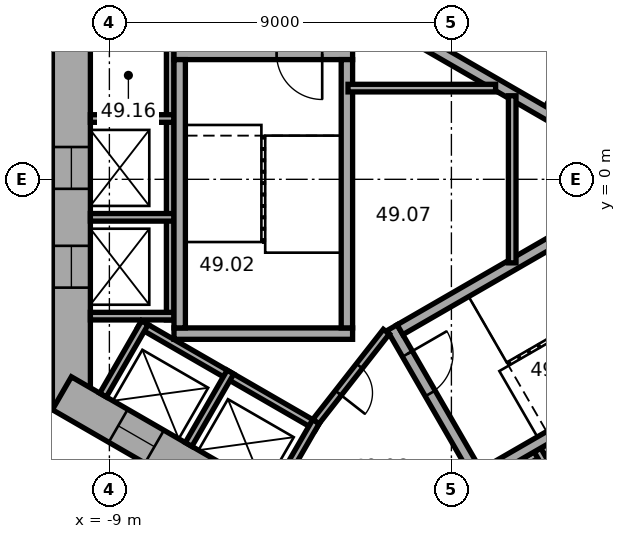
"""IFC4 building model, lengths in metres.
Left out: names, types, materials, properties, quantities, classifications, styles, units other than length and angle.
Written with IfcOpenShell. Run it as: python <this file> out.ifc"""

import sys

from ifc_helpers import new_model, si_unit, direction, frame, frame_2d, origin, place, context, subcontext, project, spatial, rectangle, extrude, element, fill, save


model = new_model("IFC4")
c1 = context("Model", 3, precision=1e-05, world=origin(), true_north=direction((0.0, 1.0)))
c2 = subcontext(c1, "Body", "Model", "MODEL_VIEW")
j1 = project(units=[si_unit("LENGTHUNIT", "METRE"), si_unit("PLANEANGLEUNIT", "RADIAN")], contexts=[c1])
p1 = place(None, origin())
s1 = spatial("IfcSite", under=j1, at=p1, CompositionType="ELEMENT")
p2 = place(p1, origin())
s2 = spatial("IfcBuilding", under=s1, at=p2, CompositionType="ELEMENT")
p3 = place(p2, frame((0.0, 0.0, 198.4)))
s3 = spatial("IfcBuildingStorey", under=s2, at=p3, CompositionType="ELEMENT", Elevation=198.4)
p4 = place(p3, frame((-10.0, 6.062, 0.0), z_axis=(0.0, 0.0, 1.0), x_axis=(0.0, -1.0, 0.0)))
e1 = element("IfcWall", 1, at=p4, inside=s3, PredefinedType="SHEAR", context=c2, shape_type="SweptSolid", body=[
    extrude(rectangle(XDim=12.125, YDim=1.0, at=frame_2d((6.062, 0.0))), origin(), (0.0, 0.0, 1.0), 3.7),
])
p5 = place(p4, frame((5.212, 0.0, 0.0)))
e2 = element("IfcOpeningElement", 2, at=p5, cuts=e1, PredefinedType="OPENING", context=c2, shape_type="SweptSolid", body=[
    extrude(rectangle(XDim=1.1, YDim=2.1, at=frame_2d((0.55, 1.05))), frame((0.0, 0.51, 0.0), z_axis=(0.0, -1.0, 0.0), x_axis=(1.0, 0.0, 0.0)), (0.0, 0.0, 1.0), 1.02),
])
p6 = place(p4, frame((7.812, 0.0, 0.0)))
e3 = element("IfcOpeningElement", 3, at=p6, cuts=e1, PredefinedType="OPENING", context=c2, shape_type="SweptSolid", body=[
    extrude(rectangle(XDim=1.1, YDim=2.1, at=frame_2d((0.55, 1.05))), frame((0.0, 0.51, 0.0), z_axis=(0.0, -1.0, 0.0), x_axis=(1.0, 0.0, 0.0)), (0.0, 0.0, 1.0), 1.02),
])
p7 = place(p3, frame((-10.25, -5.629, 0.0), z_axis=(0.0, 0.0, 1.0), x_axis=(0.866022616891, -0.50000482701, 0.0)))
e4 = element("IfcWall", 4, at=p7, inside=s3, PredefinedType="SHEAR", context=c2, shape_type="SweptSolid", body=[
    extrude(rectangle(XDim=12.125, YDim=1.0, at=frame_2d((6.062, 0.0))), origin(), (0.0, 0.0, 1.0), 3.7),
])
p8 = place(p7, frame((6.262, 0.0, 0.0)))
e5 = element("IfcOpeningElement", 5, at=p8, cuts=e4, PredefinedType="OPENING", context=c2, shape_type="SweptSolid", body=[
    extrude(rectangle(XDim=1.5, YDim=2.1, at=frame_2d((0.75, 1.05))), frame((0.0, 0.51, 0.0), z_axis=(0.0, -1.0, 0.0), x_axis=(1.0, 0.0, 0.0)), (0.0, 0.0, 1.0), 1.02),
])
p9 = place(p7, frame((1.712, 0.0, 0.0)))
e6 = element("IfcOpeningElement", 6, at=p9, cuts=e4, PredefinedType="OPENING", context=c2, shape_type="SweptSolid", body=[
    extrude(rectangle(XDim=1.1, YDim=2.1, at=frame_2d((0.55, 1.05))), frame((0.0, 0.51, 0.0), z_axis=(0.0, -1.0, 0.0), x_axis=(1.0, 0.0, 0.0)), (0.0, 0.0, 1.0), 1.02),
])
p10 = place(p7, frame((4.312, 0.0, 0.0)))
e7 = element("IfcOpeningElement", 7, at=p10, cuts=e4, PredefinedType="OPENING", context=c2, shape_type="SweptSolid", body=[
    extrude(rectangle(XDim=1.1, YDim=2.1, at=frame_2d((0.55, 1.05))), frame((0.0, 0.51, 0.0), z_axis=(0.0, -1.0, 0.0), x_axis=(1.0, 0.0, 0.0)), (0.0, 0.0, 1.0), 1.02),
])
p11 = place(p3, frame((-0.25, -11.691, 0.0), z_axis=(0.0, 0.0, 1.0), x_axis=(0.866022616891, 0.50000482701, 0.0)))
e8 = element("IfcWall", 8, at=p11, inside=s3, PredefinedType="SHEAR", context=c2, shape_type="SweptSolid", body=[
    extrude(rectangle(XDim=12.125, YDim=1.0, at=frame_2d((6.062, 0.0))), origin(), (0.0, 0.0, 1.0), 3.7),
])
p12 = place(p11, frame((2.612, 0.0, 0.0)))
e9 = element("IfcOpeningElement", 9, at=p12, cuts=e8, PredefinedType="OPENING", context=c2, shape_type="SweptSolid", body=[
    extrude(rectangle(XDim=1.1, YDim=2.1, at=frame_2d((0.55, 1.05))), frame((0.0, 0.51, 0.0), z_axis=(0.0, -1.0, 0.0), x_axis=(1.0, 0.0, 0.0)), (0.0, 0.0, 1.0), 1.02),
])
p13 = place(p11, frame((5.212, 0.0, 0.0)))
e10 = element("IfcOpeningElement", 10, at=p13, cuts=e8, PredefinedType="OPENING", context=c2, shape_type="SweptSolid", body=[
    extrude(rectangle(XDim=1.1, YDim=2.1, at=frame_2d((0.55, 1.05))), frame((0.0, 0.51, 0.0), z_axis=(0.0, -1.0, 0.0), x_axis=(1.0, 0.0, 0.0)), (0.0, 0.0, 1.0), 1.02),
])
p14 = place(p11, frame((7.812, 0.0, 0.0)))
e11 = element("IfcOpeningElement", 11, at=p14, cuts=e8, PredefinedType="OPENING", context=c2, shape_type="SweptSolid", body=[
    extrude(rectangle(XDim=1.1, YDim=2.1, at=frame_2d((0.55, 1.05))), frame((0.0, 0.51, 0.0), z_axis=(0.0, -1.0, 0.0), x_axis=(1.0, 0.0, 0.0)), (0.0, 0.0, 1.0), 1.02),
])
p15 = place(p3, frame((-7.4, 4.3, 0.0), z_axis=(0.0, 0.0, 1.0), x_axis=(0.0, -1.0, 0.0)))
e12 = element("IfcWall", 12, at=p15, inside=s3, PredefinedType="PARTITIONING", context=c2, shape_type="SweptSolid", body=[
    extrude(rectangle(XDim=8.0, YDim=0.2, at=frame_2d((4.0, 0.0))), origin(), (0.0, 0.0, 1.0), 3.42),
])
for number, where, z_axis, x_axis in (
    (13, (-7.3, 1.6, 0.0), (0.0, 0.0, 1.0), (-1.0, 0.0, 0.0)),
    (14, (-7.3, -1.0, 0.0), (0.0, 0.0, 1.0), (-1.0, 0.0, 0.0)),
    (15, (-7.3, -3.6, 0.0), (0.0, 0.0, 1.0), (-1.0, 0.0, 0.0)),
):
    element("IfcWall", number, at=place(p3, frame(where, z_axis=z_axis, x_axis=x_axis)), inside=s3, PredefinedType="PARTITIONING", context=c2, shape_type="SweptSolid", body=[
        extrude(rectangle(XDim=2.2, YDim=0.2, at=frame_2d((1.1, 0.0))), origin(), (0.0, 0.0, 1.0), 3.42),
    ])
p16 = place(p3, frame((-8.203, -3.809, 0.0), z_axis=(0.0, 0.0, 1.0), x_axis=(0.866028230842, -0.499995103361, 0.0)))
e16 = element("IfcWall", 16, at=p16, inside=s3, PredefinedType="PARTITIONING", context=c2, shape_type="SweptSolid", body=[
    extrude(rectangle(XDim=5.4, YDim=0.2, at=frame_2d((2.7, 0.0))), origin(), (0.0, 0.0, 1.0), 3.42),
])
for number, where, z_axis, x_axis in (
    (17, (-8.067, -3.772, 0.0), (0.0, 0.0, 1.0), (-0.5, -0.866, 0.0)),
    (18, (-5.815, -5.072, 0.0), (0.0, 0.0, 1.0), (-0.5, -0.866, 0.0)),
):
    element("IfcWall", number, at=place(p3, frame(where, z_axis=z_axis, x_axis=x_axis)), inside=s3, PredefinedType="PARTITIONING", context=c2, shape_type="SweptSolid", body=[
        extrude(rectangle(XDim=2.2, YDim=0.2, at=frame_2d((1.1, 0.0))), origin(), (0.0, 0.0, 1.0), 3.42),
    ])
p17 = place(p3, frame((-3.563, -6.372, 0.0), z_axis=(0.0, 0.0, 1.0), x_axis=(-0.499994660107, -0.866028486751, 0.0)))
e19 = element("IfcWall", 19, at=p17, inside=s3, PredefinedType="PARTITIONING", context=c2, shape_type="SweptSolid", body=[
    extrude(rectangle(XDim=2.2, YDim=0.2, at=frame_2d((1.1, 0.0))), origin(), (0.0, 0.0, 1.0), 3.42),
])
p18 = place(p3, frame((-0.024, -8.559, 0.0), z_axis=(0.0, 0.0, 1.0), x_axis=(0.866026010844, 0.49999894854, 0.0)))
e20 = element("IfcWall", 20, at=p18, inside=s3, PredefinedType="PARTITIONING", context=c2, shape_type="SweptSolid", body=[
    extrude(rectangle(XDim=8.0, YDim=0.2, at=frame_2d((4.0, 0.0))), origin(), (0.0, 0.0, 1.0), 3.42),
])
p19 = place(p3, frame((2.264, -7.122, 0.0), z_axis=(0.0, 0.0, 1.0), x_axis=(0.500077893725, -0.86598042715, 0.0)))
e21 = element("IfcWall", 21, at=p19, inside=s3, PredefinedType="PARTITIONING", context=c2, shape_type="SweptSolid", body=[
    extrude(rectangle(XDim=2.2, YDim=0.2, at=frame_2d((1.1, 0.0))), origin(), (0.0, 0.0, 1.0), 3.42),
])
p20 = place(p3, frame((4.103, 0.807, 0.0), z_axis=(0.0, 0.0, 1.0), x_axis=(-0.866027801685, 0.499995846692, 0.0)))
e22 = element("IfcWall", 22, at=p20, inside=s3, PredefinedType="SHEAR", context=c2, shape_type="SweptSolid", body=[
    extrude(rectangle(XDim=7.06, YDim=0.3, at=frame_2d((3.53, 0.0))), origin(), (0.0, 0.0, 1.0), 3.42),
])
p21 = place(p3, frame((-2.6, 3.3, 0.0), z_axis=(0.0, 0.0, 1.0), x_axis=(-1.0, 0.0, 0.0)))
e23 = element("IfcWall", 23, at=p21, inside=s3, PredefinedType="SHEAR", context=c2, shape_type="SweptSolid", body=[
    extrude(rectangle(XDim=4.7, YDim=0.3, at=frame_2d((2.35, 0.0))), origin(), (0.0, 0.0, 1.0), 3.42),
])
p22 = place(p21, frame((0.8, 0.0, 0.0)))
e24 = element("IfcOpeningElement", 24, at=p22, cuts=e23, PredefinedType="OPENING", context=c2, shape_type="SweptSolid", body=[
    extrude(rectangle(XDim=1.2, YDim=2.1, at=frame_2d((0.6, 1.05))), frame((0.0, 0.16, 0.0), z_axis=(0.0, -1.0, 0.0), x_axis=(1.0, 0.0, 0.0)), (0.0, 0.0, 1.0), 0.32),
])
p23 = place(p3, frame((-2.6, -4.06, 0.0), z_axis=(0.0, 0.0, 1.0), x_axis=(-1.0, 0.0, 0.0)))
e25 = element("IfcWall", 25, at=p23, inside=s3, PredefinedType="SHEAR", context=c2, shape_type="SweptSolid", body=[
    extrude(rectangle(XDim=4.7, YDim=0.3, at=frame_2d((2.35, 0.0))), origin(), (0.0, 0.0, 1.0), 3.42),
])
for number, where, z_axis, x_axis in (
    (26, (-2.75, 3.15, 0.0), (0.0, 0.0, 1.0), (0.0, -1.0, 0.0)),
    (27, (-7.15, 3.15, 0.0), (0.0, 0.0, 1.0), (0.0, -1.0, 0.0)),
):
    element("IfcWall", number, at=place(p3, frame(where, z_axis=z_axis, x_axis=x_axis)), inside=s3, PredefinedType="SHEAR", context=c2, shape_type="SweptSolid", body=[
        extrude(rectangle(XDim=7.06, YDim=0.3, at=frame_2d((3.53, 0.0))), origin(), (0.0, 0.0, 1.0), 3.42),
    ])
p24 = place(p3, frame((-1.558, -3.902, 0.0), z_axis=(0.0, 0.0, 1.0), x_axis=(0.499977259774, -0.866038532462, 0.0)))
e28 = element("IfcWall", 28, at=p24, inside=s3, PredefinedType="SHEAR", context=c2, shape_type="SweptSolid", body=[
    extrude(rectangle(XDim=4.7, YDim=0.3, at=frame_2d((2.35, 0.0))), origin(), (0.0, 0.0, 1.0), 3.42),
])
p25 = place(p24, frame((0.8, 0.0, 0.0)))
e29 = element("IfcOpeningElement", 29, at=p25, cuts=e28, PredefinedType="OPENING", context=c2, shape_type="SweptSolid", body=[
    extrude(rectangle(XDim=1.2, YDim=2.1, at=frame_2d((0.6, 1.05))), frame((0.0, 0.16, 0.0), z_axis=(0.0, -1.0, 0.0), x_axis=(1.0, 0.0, 0.0)), (0.0, 0.0, 1.0), 0.32),
])
for number, where, z_axis, x_axis in (
    (30, (-1.353, -3.957, 0.0), (0.0, 0.0, 1.0), (0.866, 0.5, 0.0)),
    (31, (0.847, -7.767, 0.0), (0.0, 0.0, 1.0), (0.866, 0.5, 0.0)),
):
    element("IfcWall", number, at=place(p3, frame(where, z_axis=z_axis, x_axis=x_axis)), inside=s3, PredefinedType="SHEAR", context=c2, shape_type="SweptSolid", body=[
        extrude(rectangle(XDim=7.06, YDim=0.3, at=frame_2d((3.53, 0.0))), origin(), (0.0, 0.0, 1.0), 3.42),
    ])
p26 = place(p3, frame((-1.712, -4.008, 0.0), z_axis=(0.0, 0.0, 1.0), x_axis=(-0.616549420702, -0.787316208287, 0.0)))
e32 = element("IfcWall", 32, at=p26, inside=s3, PredefinedType="PARTITIONING", context=c2, shape_type="SweptSolid", body=[
    extrude(rectangle(XDim=3.002, YDim=0.2, at=frame_2d((1.501, 0.0))), origin(), (0.0, 0.0, 1.0), 3.42),
])
p27 = place(p26, frame((1.15, 0.0, 0.0)))
e33 = element("IfcOpeningElement", 33, at=p27, cuts=e32, PredefinedType="OPENING", context=c2, shape_type="SweptSolid", body=[
    extrude(rectangle(XDim=0.9, YDim=2.1, at=frame_2d((0.45, 1.05))), frame((0.0, 0.11, 0.0), z_axis=(0.0, -1.0, 0.0), x_axis=(1.0, 0.0, 0.0)), (0.0, 0.0, 1.0), 0.22),
])
p28 = place(p3, frame((-2.72, 2.4, 0.0), z_axis=(0.0, 0.0, 1.0), x_axis=(1.0, 0.0, 0.0)))
e34 = element("IfcWall", 34, at=p28, inside=s3, PredefinedType="PARTITIONING", context=c2, shape_type="SweptSolid", body=[
    extrude(rectangle(XDim=3.883, YDim=0.2, at=frame_2d((1.941, 0.0))), origin(), (0.0, 0.0, 1.0), 3.42),
])
p29 = place(p3, frame((1.6, -2.198, 0.0), z_axis=(0.0, 0.0, 1.0), x_axis=(0.0, 1.0, 0.0)))
e35 = element("IfcWall", 35, at=p29, inside=s3, PredefinedType="PARTITIONING", context=c2, shape_type="SweptSolid", body=[
    extrude(rectangle(XDim=4.397, YDim=0.2, at=frame_2d((2.198, 0.0))), origin(), (0.0, 0.0, 1.0), 3.42),
])
p30 = place(p22, origin())
e36 = element("IfcDoor", 36, at=p30, inside=s3, OperationType="SINGLE_SWING_RIGHT", PredefinedType="DOOR", context=c2, shape_type="SweptSolid", body=[
    extrude(rectangle(XDim=1.2, YDim=2.1, at=frame_2d((0.6, 1.05))), frame((0.0, 0.025, 0.0), z_axis=(0.0, -1.0, 0.0), x_axis=(1.0, 0.0, 0.0)), (0.0, 0.0, 1.0), 0.05),
])
fill(e24, e36)
p31 = place(p25, origin())
e37 = element("IfcDoor", 37, at=p31, inside=s3, OperationType="SINGLE_SWING_RIGHT", PredefinedType="DOOR", context=c2, shape_type="SweptSolid", body=[
    extrude(rectangle(XDim=1.2, YDim=2.1, at=frame_2d((0.6, 1.05))), frame((0.0, 0.025, 0.0), z_axis=(0.0, -1.0, 0.0), x_axis=(1.0, 0.0, 0.0)), (0.0, 0.0, 1.0), 0.05),
])
fill(e29, e37)
p32 = place(p27, origin())
e38 = element("IfcDoor", 38, at=p32, inside=s3, OperationType="SINGLE_SWING_LEFT", PredefinedType="DOOR", context=c2, shape_type="SweptSolid", body=[
    extrude(rectangle(XDim=0.9, YDim=2.1, at=frame_2d((0.45, 1.05))), frame((0.0, 0.025, 0.0), z_axis=(0.0, -1.0, 0.0), x_axis=(1.0, 0.0, 0.0)), (0.0, 0.0, 1.0), 0.05),
])
fill(e33, e38)
p33 = place(p5, origin())
e39 = element("IfcDoor", 39, at=p33, inside=s3, OperationType="DOUBLE_DOOR_SLIDING", PredefinedType="DOOR", context=c2, shape_type="SweptSolid", body=[
    extrude(rectangle(XDim=1.1, YDim=2.1, at=frame_2d((0.55, 1.05))), frame((0.0, 0.025, 0.0), z_axis=(0.0, -1.0, 0.0), x_axis=(1.0, 0.0, 0.0)), (0.0, 0.0, 1.0), 0.05),
])
fill(e2, e39)
p34 = place(p6, origin())
e40 = element("IfcDoor", 40, at=p34, inside=s3, OperationType="DOUBLE_DOOR_SLIDING", PredefinedType="DOOR", context=c2, shape_type="SweptSolid", body=[
    extrude(rectangle(XDim=1.1, YDim=2.1, at=frame_2d((0.55, 1.05))), frame((0.0, 0.025, 0.0), z_axis=(0.0, -1.0, 0.0), x_axis=(1.0, 0.0, 0.0)), (0.0, 0.0, 1.0), 0.05),
])
fill(e3, e40)
p35 = place(p9, origin())
e41 = element("IfcDoor", 41, at=p35, inside=s3, OperationType="DOUBLE_DOOR_SLIDING", PredefinedType="DOOR", context=c2, shape_type="SweptSolid", body=[
    extrude(rectangle(XDim=1.1, YDim=2.1, at=frame_2d((0.55, 1.05))), frame((0.0, 0.025, 0.0), z_axis=(0.0, -1.0, 0.0), x_axis=(1.0, 0.0, 0.0)), (0.0, 0.0, 1.0), 0.05),
])
fill(e6, e41)
save(model, sys.argv[1])
